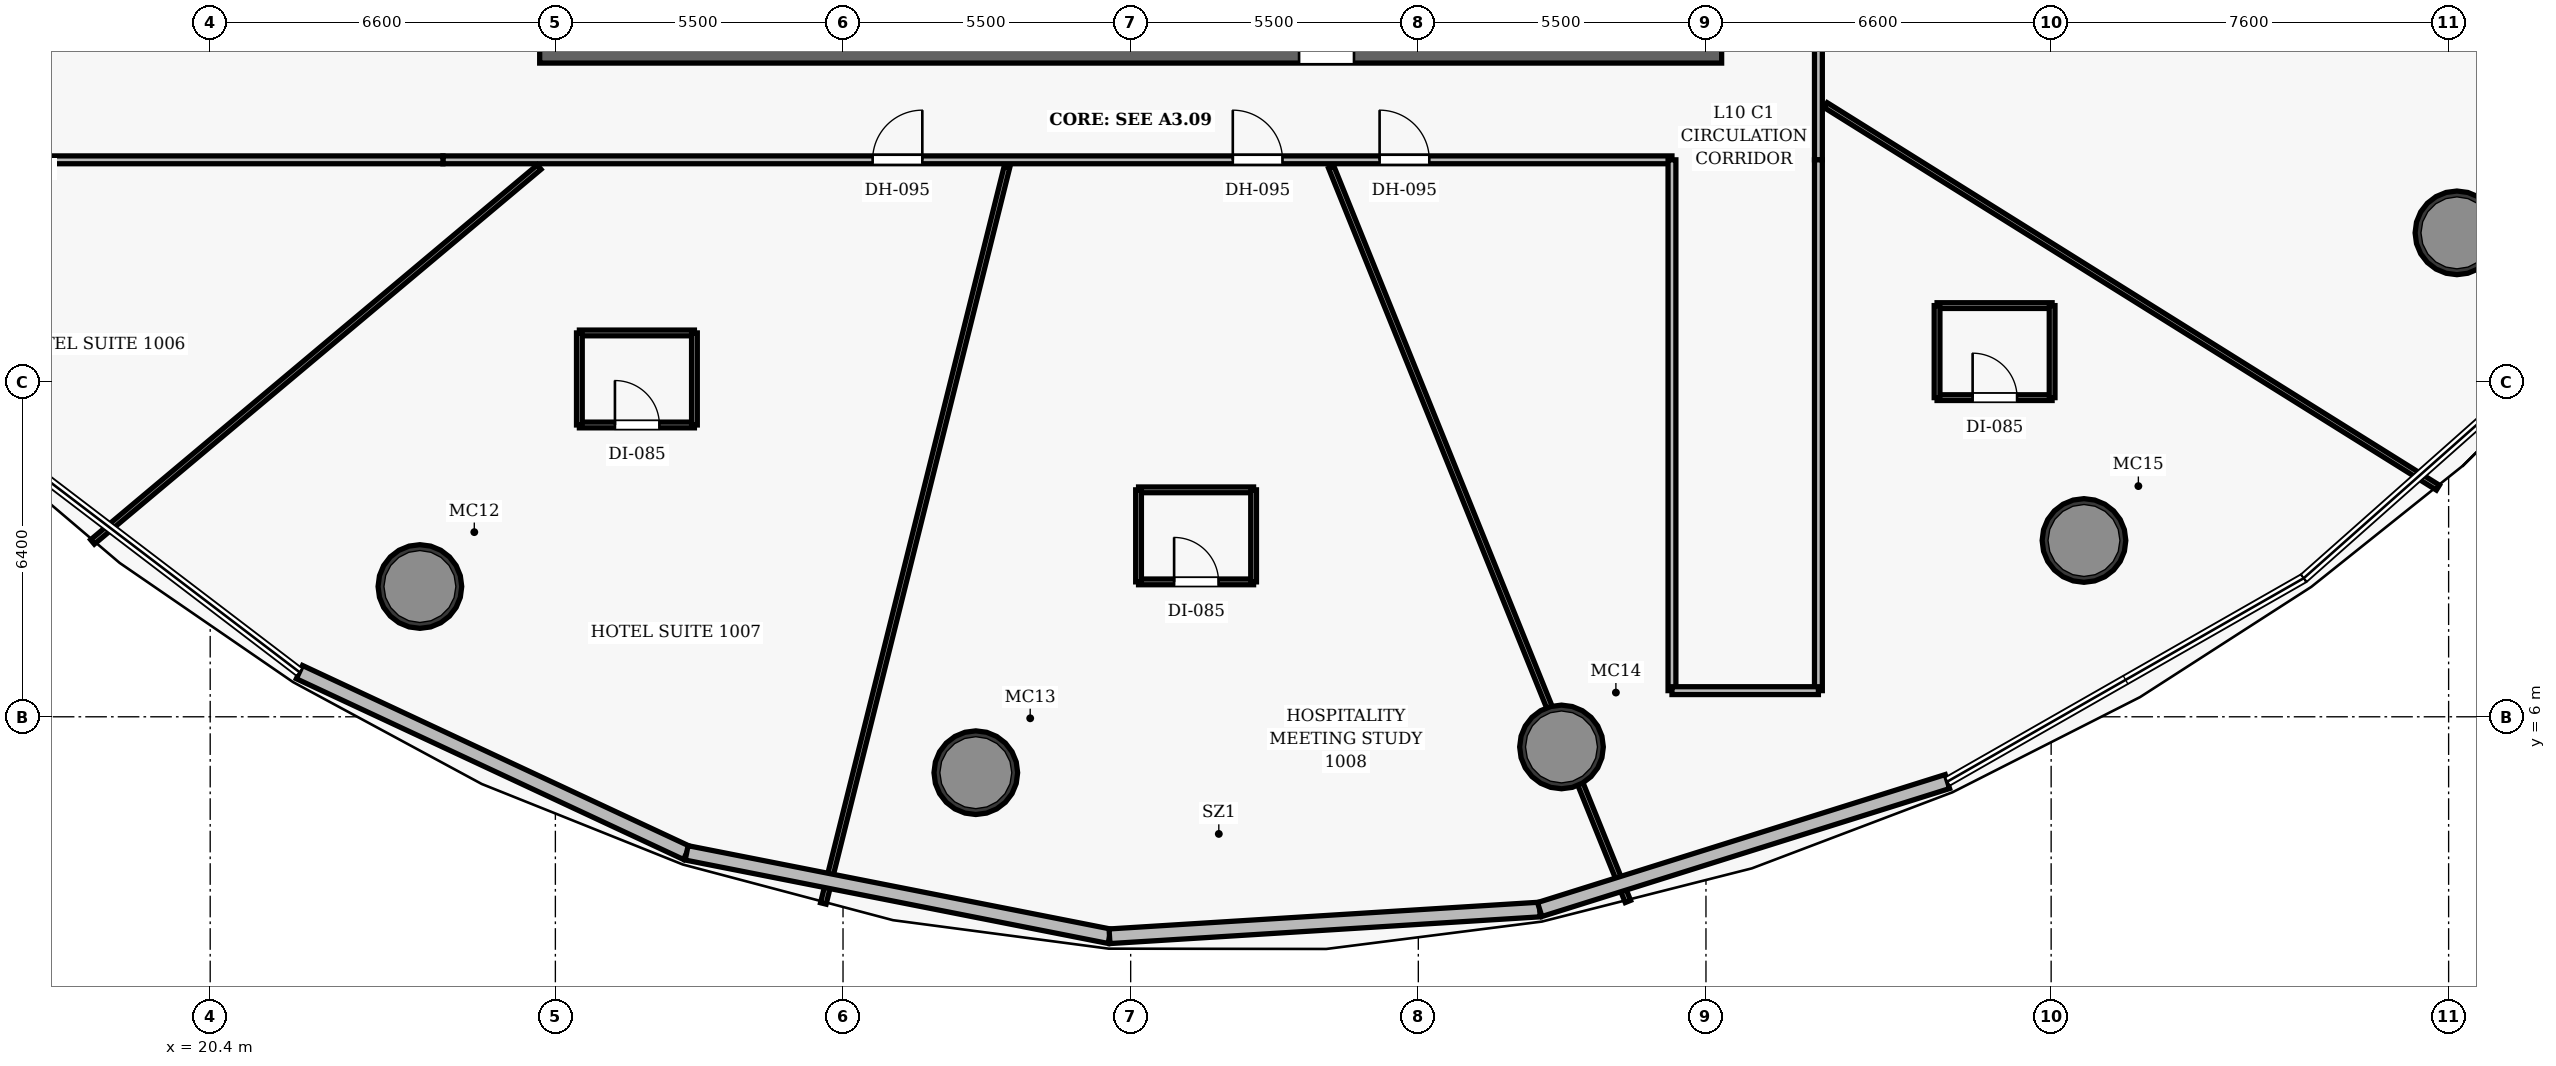
"""IFC4 building model, lengths in metres.
Left out: names, types, materials, properties, quantities, classifications, styles, units other than length and angle.
Written with IfcOpenShell. Run it as: python <this file> out.ifc"""

import sys

from ifc_helpers import new_model, si_unit, direction, frame, frame_2d, origin, origin_2d, place, context, subcontext, project, spatial, rectangle, hollow_circle, extrude, element, fill, save


model = new_model("IFC4")
c1 = context("Model", 3, precision=1e-05, world=origin(), true_north=direction((0.0, 1.0)))
c2 = subcontext(c1, "Body", "Model", "MODEL_VIEW")
j1 = project(units=[si_unit("LENGTHUNIT", "METRE"), si_unit("PLANEANGLEUNIT", "RADIAN")], contexts=[c1])
p1 = place(None, origin())
s1 = spatial("IfcSite", under=j1, at=p1, CompositionType="ELEMENT")
p2 = place(p1, origin())
s2 = spatial("IfcBuilding", under=s1, at=p2, CompositionType="ELEMENT")
p3 = place(p2, frame((0.0, 0.0, 51.9)))
s3 = spatial("IfcBuildingStorey", under=s2, at=p3, CompositionType="ELEMENT", Elevation=51.9)
p4 = place(p3, frame((26.7, 18.8, 0.0), z_axis=(0.0, 0.0, 1.0), x_axis=(1.0, 0.0, 0.0)))
e1 = element("IfcWall", 1, at=p4, inside=s3, PredefinedType="SHEAR", context=c2, shape_type="SweptSolid", body=[
    extrude(rectangle(XDim=22.6, YDim=0.6, at=frame_2d((11.3, 0.0))), origin(), (0.0, 0.0, 1.0), 3.5),
])
p5 = place(p4, frame((14.52, 0.0, 0.0)))
e2 = element("IfcOpeningElement", 2, at=p5, cuts=e1, PredefinedType="OPENING", context=c2, shape_type="SweptSolid", body=[
    extrude(rectangle(XDim=1.05, YDim=2.15, at=frame_2d((0.525, 1.075))), frame((0.0, 0.31, 0.0), z_axis=(0.0, -1.0, 0.0), x_axis=(1.0, 0.0, 0.0)), (0.0, 0.0, 1.0), 0.62),
])
for number, where, z_axis, x_axis in (
    (3, (24.41, 8.491, 0.0), (0.0, 0.0, 1.0), (1.0, 0.0, 0.0)),
    (4, (35.039, 4.931, 0.0), (0.0, 0.0, 1.0), (1.0, 0.0, 0.0)),
    (5, (46.238, 5.423, 0.0), (0.0, 0.0, 1.0), (1.0, 0.0, 0.0)),
    (6, (56.228, 9.371, 0.0), (0.0, 0.0, 1.0), (1.0, 0.0, 0.0)),
    (7, (63.359, 15.254, 0.0), (0.0, 0.0, 1.0), (1.0, 0.0, 0.0)),
):
    element("IfcColumn", number, at=place(p3, frame(where, z_axis=z_axis, x_axis=x_axis)), inside=s3, PredefinedType="COLUMN", context=c2, shape_type="SweptSolid", body=[
        extrude(hollow_circle(Radius=0.8, WallThickness=0.06, at=origin_2d()), origin(), (0.0, 0.0, 1.0), 3.5),
    ])
p6 = place(p3, frame((24.85, 16.65, 0.0), z_axis=(0.0, 0.0, 1.0), x_axis=(1.0, 0.0, 0.0)))
e8 = element("IfcWall", 8, at=p6, inside=s3, PredefinedType="PARTITIONING", context=c2, shape_type="SweptSolid", body=[
    extrude(rectangle(XDim=23.5, YDim=0.15, at=frame_2d((11.75, 0.0))), origin(), (0.0, 0.0, 1.0), 2.6),
])
p7 = place(p6, frame((8.216, 0.0, 0.0)))
e9 = element("IfcOpeningElement", 9, at=p7, cuts=e8, PredefinedType="OPENING", context=c2, shape_type="SweptSolid", body=[
    extrude(rectangle(XDim=0.95, YDim=2.15, at=frame_2d((0.475, 1.075))), frame((0.0, 0.085, 0.0), z_axis=(0.0, -1.0, 0.0), x_axis=(1.0, 0.0, 0.0)), (0.0, 0.0, 1.0), 0.17),
])
p8 = place(p6, frame((15.103, 0.0, 0.0)))
e10 = element("IfcOpeningElement", 10, at=p8, cuts=e8, PredefinedType="OPENING", context=c2, shape_type="SweptSolid", body=[
    extrude(rectangle(XDim=0.95, YDim=2.15, at=frame_2d((0.475, 1.075))), frame((0.0, 0.085, 0.0), z_axis=(0.0, -1.0, 0.0), x_axis=(1.0, 0.0, 0.0)), (0.0, 0.0, 1.0), 0.17),
])
p9 = place(p6, frame((17.91, 0.0, 0.0)))
e11 = element("IfcOpeningElement", 11, at=p9, cuts=e8, PredefinedType="OPENING", context=c2, shape_type="SweptSolid", body=[
    extrude(rectangle(XDim=0.95, YDim=2.15, at=frame_2d((0.475, 1.075))), frame((0.0, 0.085, 0.0), z_axis=(0.0, -1.0, 0.0), x_axis=(1.0, 0.0, 0.0)), (0.0, 0.0, 1.0), 0.17),
])
p10 = place(p3, frame((51.15, 16.65, 0.0), z_axis=(0.0, 0.0, 1.0), x_axis=(0.0, 1.0, 0.0)))
e12 = element("IfcWall", 12, at=p10, inside=s3, PredefinedType="PARTITIONING", context=c2, shape_type="SweptSolid", body=[
    extrude(rectangle(XDim=15.9, YDim=0.15, at=frame_2d((7.95, 0.0))), origin(), (0.0, 0.0, 1.0), 2.6),
])
p11 = place(p10, frame((10.986, 0.0, 0.0)))
e13 = element("IfcOpeningElement", 13, at=p11, cuts=e12, PredefinedType="OPENING", context=c2, shape_type="SweptSolid", body=[
    extrude(rectangle(XDim=0.95, YDim=2.15, at=frame_2d((0.475, 1.075))), frame((0.0, 0.085, 0.0), z_axis=(0.0, -1.0, 0.0), x_axis=(1.0, 0.0, 0.0)), (0.0, 0.0, 1.0), 0.17),
])
p12 = place(p10, frame((7.645, 0.0, 0.0)))
e14 = element("IfcOpeningElement", 14, at=p12, cuts=e12, PredefinedType="OPENING", context=c2, shape_type="SweptSolid", body=[
    extrude(rectangle(XDim=0.95, YDim=2.15, at=frame_2d((0.475, 1.075))), frame((0.0, 0.085, 0.0), z_axis=(0.0, -1.0, 0.0), x_axis=(1.0, 0.0, 0.0)), (0.0, 0.0, 1.0), 0.17),
])
p13 = place(p3, frame((12.355, 16.65, 0.0), z_axis=(0.0, 0.0, 1.0), x_axis=(1.0, 0.0, 0.0)))
e15 = element("IfcWall", 15, at=p13, inside=s3, PredefinedType="PARTITIONING", context=c2, shape_type="SweptSolid", body=[
    extrude(rectangle(XDim=12.495, YDim=0.15, at=frame_2d((6.247, 0.0))), origin(), (0.0, 0.0, 1.0), 2.6),
])
for number, where, z_axis, x_axis in (
    (16, (48.35, 6.5, 0.0), (0.0, 0.0, 1.0), (0.0, 1.0, 0.0)),
    (17, (51.15, 6.5, 0.0), (0.0, 0.0, 1.0), (0.0, 1.0, 0.0)),
):
    element("IfcWall", number, at=place(p3, frame(where, z_axis=z_axis, x_axis=x_axis)), inside=s3, PredefinedType="PARTITIONING", context=c2, shape_type="SweptSolid", body=[
        extrude(rectangle(XDim=10.15, YDim=0.15, at=frame_2d((5.075, 0.0))), origin(), (0.0, 0.0, 1.0), 2.6),
    ])
p14 = place(p3, frame((48.35, 6.5, 0.0), z_axis=(0.0, 0.0, 1.0), x_axis=(1.0, 0.0, 0.0)))
e18 = element("IfcWall", 18, at=p14, inside=s3, PredefinedType="PARTITIONING", context=c2, shape_type="SweptSolid", body=[
    extrude(rectangle(XDim=2.8, YDim=0.15, at=frame_2d((1.4, 0.0))), origin(), (0.0, 0.0, 1.0), 2.6),
])
p15 = place(p3, frame((26.69, 16.51, 0.0), z_axis=(0.0, 0.0, 1.0), x_axis=(-0.766039528177, -0.642793467041, 0.0)))
e19 = element("IfcWall", 19, at=p15, inside=s3, PredefinedType="PARTITIONING", context=c2, shape_type="SweptSolid", body=[
    extrude(rectangle(XDim=11.149, YDim=0.11, at=frame_2d((5.574, 0.0))), origin(), (0.0, 0.0, 1.0), 2.6),
])
p16 = place(p3, frame((35.634, 16.51, 0.0), z_axis=(0.0, 0.0, 1.0), x_axis=(-0.241925920225, -0.970294722815, 0.0)))
e20 = element("IfcWall", 20, at=p16, inside=s3, PredefinedType="PARTITIONING", context=c2, shape_type="SweptSolid", body=[
    extrude(rectangle(XDim=14.511, YDim=0.11, at=frame_2d((7.255, 0.0))), origin(), (0.0, 0.0, 1.0), 2.6),
])
p17 = place(p3, frame((41.834, 16.51, 0.0), z_axis=(0.0, 0.0, 1.0), x_axis=(0.374612575017, -0.927181437821, 0.0)))
e21 = element("IfcWall", 21, at=p17, inside=s3, PredefinedType="PARTITIONING", context=c2, shape_type="SweptSolid", body=[
    extrude(rectangle(XDim=15.145, YDim=0.11, at=frame_2d((7.572, 0.0))), origin(), (0.0, 0.0, 1.0), 2.6),
])
p18 = place(p3, frame((51.29, 17.696, 0.0), z_axis=(0.0, 0.0, 1.0), x_axis=(0.848048981213, -0.529917847844, 0.0)))
e22 = element("IfcWall", 22, at=p18, inside=s3, PredefinedType="PARTITIONING", context=c2, shape_type="SweptSolid", body=[
    extrude(rectangle(XDim=13.802, YDim=0.11, at=frame_2d((6.901, 0.0))), origin(), (0.0, 0.0, 1.0), 2.6),
])
p19 = place(p3, frame((27.459, 11.58, 0.0), z_axis=(0.0, 0.0, 1.0), x_axis=(1.0, 0.0, 0.0)))
e23 = element("IfcWall", 23, at=p19, inside=s3, PredefinedType="PARTITIONING", context=c2, shape_type="SweptSolid", body=[
    extrude(rectangle(XDim=2.2, YDim=0.11, at=frame_2d((1.1, 0.0))), origin(), (0.0, 0.0, 1.0), 2.6),
])
p20 = place(p19, frame((0.68, 0.0, 0.0)))
e24 = element("IfcOpeningElement", 24, at=p20, cuts=e23, PredefinedType="OPENING", context=c2, shape_type="SweptSolid", body=[
    extrude(rectangle(XDim=0.85, YDim=2.1, at=frame_2d((0.425, 1.05))), frame((0.0, 0.065, 0.0), z_axis=(0.0, -1.0, 0.0), x_axis=(1.0, 0.0, 0.0)), (0.0, 0.0, 1.0), 0.13),
])
p21 = place(p3, frame((27.459, 13.34, 0.0), z_axis=(0.0, 0.0, 1.0), x_axis=(1.0, 0.0, 0.0)))
e25 = element("IfcWall", 25, at=p21, inside=s3, PredefinedType="PARTITIONING", context=c2, shape_type="SweptSolid", body=[
    extrude(rectangle(XDim=2.2, YDim=0.11, at=frame_2d((1.1, 0.0))), origin(), (0.0, 0.0, 1.0), 2.6),
])
for number, where, z_axis, x_axis in (
    (26, (27.459, 11.58, 0.0), (0.0, 0.0, 1.0), (0.0, 1.0, 0.0)),
    (27, (29.659, 11.58, 0.0), (0.0, 0.0, 1.0), (0.0, 1.0, 0.0)),
):
    element("IfcWall", number, at=place(p3, frame(where, z_axis=z_axis, x_axis=x_axis)), inside=s3, PredefinedType="PARTITIONING", context=c2, shape_type="SweptSolid", body=[
        extrude(rectangle(XDim=1.76, YDim=0.11, at=frame_2d((0.88, 0.0))), origin(), (0.0, 0.0, 1.0), 2.6),
    ])
p22 = place(p3, frame((38.151, 8.58, 0.0), z_axis=(0.0, 0.0, 1.0), x_axis=(1.0, 0.0, 0.0)))
e28 = element("IfcWall", 28, at=p22, inside=s3, PredefinedType="PARTITIONING", context=c2, shape_type="SweptSolid", body=[
    extrude(rectangle(XDim=2.2, YDim=0.11, at=frame_2d((1.1, 0.0))), origin(), (0.0, 0.0, 1.0), 2.6),
])
p23 = place(p22, frame((0.68, 0.0, 0.0)))
e29 = element("IfcOpeningElement", 29, at=p23, cuts=e28, PredefinedType="OPENING", context=c2, shape_type="SweptSolid", body=[
    extrude(rectangle(XDim=0.85, YDim=2.1, at=frame_2d((0.425, 1.05))), frame((0.0, 0.065, 0.0), z_axis=(0.0, -1.0, 0.0), x_axis=(1.0, 0.0, 0.0)), (0.0, 0.0, 1.0), 0.13),
])
p24 = place(p3, frame((38.151, 10.34, 0.0), z_axis=(0.0, 0.0, 1.0), x_axis=(1.0, 0.0, 0.0)))
e30 = element("IfcWall", 30, at=p24, inside=s3, PredefinedType="PARTITIONING", context=c2, shape_type="SweptSolid", body=[
    extrude(rectangle(XDim=2.2, YDim=0.11, at=frame_2d((1.1, 0.0))), origin(), (0.0, 0.0, 1.0), 2.6),
])
for number, where, z_axis, x_axis in (
    (31, (38.151, 8.58, 0.0), (0.0, 0.0, 1.0), (0.0, 1.0, 0.0)),
    (32, (40.351, 8.58, 0.0), (0.0, 0.0, 1.0), (0.0, 1.0, 0.0)),
):
    element("IfcWall", number, at=place(p3, frame(where, z_axis=z_axis, x_axis=x_axis)), inside=s3, PredefinedType="PARTITIONING", context=c2, shape_type="SweptSolid", body=[
        extrude(rectangle(XDim=1.76, YDim=0.11, at=frame_2d((0.88, 0.0))), origin(), (0.0, 0.0, 1.0), 2.6),
    ])
p25 = place(p3, frame((53.419, 12.103, 0.0), z_axis=(0.0, 0.0, 1.0), x_axis=(1.0, 0.0, 0.0)))
e33 = element("IfcWall", 33, at=p25, inside=s3, PredefinedType="PARTITIONING", context=c2, shape_type="SweptSolid", body=[
    extrude(rectangle(XDim=2.2, YDim=0.11, at=frame_2d((1.1, 0.0))), origin(), (0.0, 0.0, 1.0), 2.6),
])
p26 = place(p25, frame((0.68, 0.0, 0.0)))
e34 = element("IfcOpeningElement", 34, at=p26, cuts=e33, PredefinedType="OPENING", context=c2, shape_type="SweptSolid", body=[
    extrude(rectangle(XDim=0.85, YDim=2.1, at=frame_2d((0.425, 1.05))), frame((0.0, 0.065, 0.0), z_axis=(0.0, -1.0, 0.0), x_axis=(1.0, 0.0, 0.0)), (0.0, 0.0, 1.0), 0.13),
])
p27 = place(p3, frame((53.419, 13.863, 0.0), z_axis=(0.0, 0.0, 1.0), x_axis=(1.0, 0.0, 0.0)))
e35 = element("IfcWall", 35, at=p27, inside=s3, PredefinedType="PARTITIONING", context=c2, shape_type="SweptSolid", body=[
    extrude(rectangle(XDim=2.2, YDim=0.11, at=frame_2d((1.1, 0.0))), origin(), (0.0, 0.0, 1.0), 2.6),
])
for number, where, z_axis, x_axis in (
    (36, (53.419, 12.103, 0.0), (0.0, 0.0, 1.0), (0.0, 1.0, 0.0)),
    (37, (55.619, 12.103, 0.0), (0.0, 0.0, 1.0), (0.0, 1.0, 0.0)),
):
    element("IfcWall", number, at=place(p3, frame(where, z_axis=z_axis, x_axis=x_axis)), inside=s3, PredefinedType="PARTITIONING", context=c2, shape_type="SweptSolid", body=[
        extrude(rectangle(XDim=1.76, YDim=0.11, at=frame_2d((0.88, 0.0))), origin(), (0.0, 0.0, 1.0), 2.6),
    ])
p28 = place(p3, frame((29.51, 3.398, 0.0), z_axis=(0.0, 0.0, 1.0), x_axis=(-0.906127407847, 0.423004870833, 0.0)))
e38 = element("IfcWall", 38, at=p28, inside=s3, PredefinedType="SOLIDWALL", context=c2, shape_type="SweptSolid", body=[
    extrude(rectangle(XDim=8.171, YDim=0.28, at=frame_2d((4.085, 0.0))), origin(), (0.0, 0.0, 1.0), 3.25),
])
p29 = place(p3, frame((37.595, 1.803, 0.0), z_axis=(0.0, 0.0, 1.0), x_axis=(-0.981099048481, 0.19350621972, 0.0)))
e39 = element("IfcWall", 39, at=p29, inside=s3, PredefinedType="SOLIDWALL", context=c2, shape_type="SweptSolid", body=[
    extrude(rectangle(XDim=8.241, YDim=0.28, at=frame_2d((4.121, 0.0))), origin(), (0.0, 0.0, 1.0), 3.25),
])
p30 = place(p3, frame((45.821, 2.314, 0.0), z_axis=(0.0, 0.0, 1.0), x_axis=(-0.99807418835, -0.062031560917, 0.0)))
e40 = element("IfcWall", 40, at=p30, inside=s3, PredefinedType="SOLIDWALL", context=c2, shape_type="SweptSolid", body=[
    extrude(rectangle(XDim=8.241, YDim=0.28, at=frame_2d((4.121, 0.0))), origin(), (0.0, 0.0, 1.0), 3.25),
])
p31 = place(p3, frame((53.617, 4.761, 0.0), z_axis=(0.0, 0.0, 1.0), x_axis=(-0.954100123885, -0.299487818787, 0.0)))
e41 = element("IfcWall", 41, at=p31, inside=s3, PredefinedType="SOLIDWALL", context=c2, shape_type="SweptSolid", body=[
    extrude(rectangle(XDim=8.171, YDim=0.28, at=frame_2d((4.085, 0.0))), origin(), (0.0, 0.0, 1.0), 3.25),
])
p32 = place(p7, origin())
e42 = element("IfcDoor", 42, at=p32, inside=s3, OperationType="SINGLE_SWING_RIGHT", PredefinedType="DOOR", context=c2, shape_type="SweptSolid", body=[
    extrude(rectangle(XDim=0.95, YDim=2.15, at=frame_2d((0.475, 1.075))), frame((0.0, 0.025, 0.0), z_axis=(0.0, -1.0, 0.0), x_axis=(1.0, 0.0, 0.0)), (0.0, 0.0, 1.0), 0.05),
])
fill(e9, e42)
p33 = place(p20, origin())
e43 = element("IfcDoor", 43, at=p33, inside=s3, OperationType="SINGLE_SWING_LEFT", PredefinedType="DOOR", context=c2, shape_type="SweptSolid", body=[
    extrude(rectangle(XDim=0.85, YDim=2.1, at=frame_2d((0.425, 1.05))), frame((0.0, 0.025, 0.0), z_axis=(0.0, -1.0, 0.0), x_axis=(1.0, 0.0, 0.0)), (0.0, 0.0, 1.0), 0.05),
])
fill(e24, e43)
p34 = place(p8, origin())
e44 = element("IfcDoor", 44, at=p34, inside=s3, OperationType="SINGLE_SWING_LEFT", PredefinedType="DOOR", context=c2, shape_type="SweptSolid", body=[
    extrude(rectangle(XDim=0.95, YDim=2.15, at=frame_2d((0.475, 1.075))), frame((0.0, 0.025, 0.0), z_axis=(0.0, -1.0, 0.0), x_axis=(1.0, 0.0, 0.0)), (0.0, 0.0, 1.0), 0.05),
])
fill(e10, e44)
p35 = place(p23, origin())
e45 = element("IfcDoor", 45, at=p35, inside=s3, OperationType="SINGLE_SWING_LEFT", PredefinedType="DOOR", context=c2, shape_type="SweptSolid", body=[
    extrude(rectangle(XDim=0.85, YDim=2.1, at=frame_2d((0.425, 1.05))), frame((0.0, 0.025, 0.0), z_axis=(0.0, -1.0, 0.0), x_axis=(1.0, 0.0, 0.0)), (0.0, 0.0, 1.0), 0.05),
])
fill(e29, e45)
p36 = place(p9, origin())
e46 = element("IfcDoor", 46, at=p36, inside=s3, OperationType="SINGLE_SWING_LEFT", PredefinedType="DOOR", context=c2, shape_type="SweptSolid", body=[
    extrude(rectangle(XDim=0.95, YDim=2.15, at=frame_2d((0.475, 1.075))), frame((0.0, 0.025, 0.0), z_axis=(0.0, -1.0, 0.0), x_axis=(1.0, 0.0, 0.0)), (0.0, 0.0, 1.0), 0.05),
])
fill(e11, e46)
p37 = place(p26, origin())
e47 = element("IfcDoor", 47, at=p37, inside=s3, OperationType="SINGLE_SWING_LEFT", PredefinedType="DOOR", context=c2, shape_type="SweptSolid", body=[
    extrude(rectangle(XDim=0.85, YDim=2.1, at=frame_2d((0.425, 1.05))), frame((0.0, 0.025, 0.0), z_axis=(0.0, -1.0, 0.0), x_axis=(1.0, 0.0, 0.0)), (0.0, 0.0, 1.0), 0.05),
])
fill(e34, e47)
save(model, sys.argv[1])
